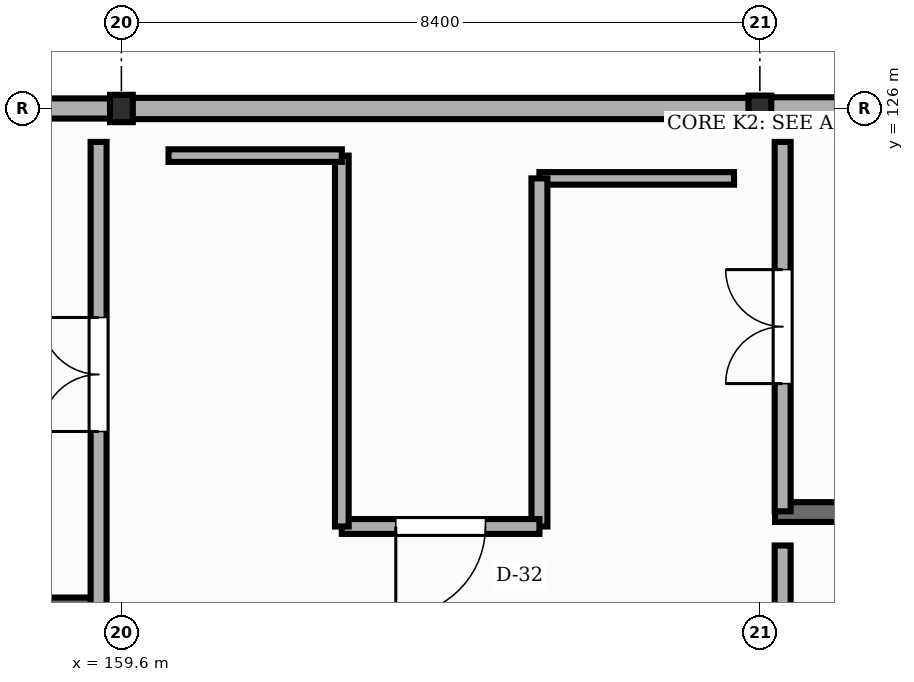
"""IFC4 building model, lengths in metres.
Left out: names, types, materials, properties, quantities, classifications, styles, units other than length and angle.
Written with IfcOpenShell. Run it as: python <this file> out.ifc"""

import sys

from ifc_helpers import new_model, si_unit, direction, frame, frame_2d, origin, origin_2d, place, context, subcontext, project, spatial, rectangle, i_section, extrude, element, fill, save


model = new_model("IFC4")
c1 = context("Model", 3, precision=1e-05, world=origin(), true_north=direction((0.0, 1.0)))
c2 = subcontext(c1, "Body", "Model", "MODEL_VIEW")
j1 = project(units=[si_unit("LENGTHUNIT", "METRE"), si_unit("PLANEANGLEUNIT", "RADIAN")], contexts=[c1])
p1 = place(None, origin())
s1 = spatial("IfcSite", under=j1, at=p1, CompositionType="ELEMENT")
p2 = place(p1, origin())
s2 = spatial("IfcBuilding", under=s1, at=p2, CompositionType="ELEMENT")
p3 = place(p2, frame((0.0, 0.0, 26.1)))
s3 = spatial("IfcBuildingStorey", under=s2, at=p3, CompositionType="ELEMENT", Elevation=26.1)
p4 = place(p3, frame((159.6, 126.0, 0.0), z_axis=(0.0, 0.0, 1.0), x_axis=(1.0, 0.0, 0.0)))
e1 = element("IfcColumn", 1, at=p4, inside=s3, PredefinedType="COLUMN", context=c2, shape_type="SweptSolid", body=[
    extrude(i_section(OverallWidth=0.3, OverallDepth=0.36, WebThickness=0.012, FlangeThickness=0.022, FilletRadius=0.027, at=origin_2d()), origin(), (0.0, 0.0, 1.0), 4.05),
])
p5 = place(p3, frame((168.0, 126.0, 0.0), z_axis=(0.0, 0.0, 1.0), x_axis=(1.0, 0.0, 0.0)))
e2 = element("IfcColumn", 2, at=p5, inside=s3, PredefinedType="COLUMN", context=c2, shape_type="SweptSolid", body=[
    extrude(i_section(OverallWidth=0.3, OverallDepth=0.34, WebThickness=0.012, FlangeThickness=0.021, FilletRadius=0.027, at=origin_2d()), origin(), (0.0, 0.0, 1.0), 4.05),
])
p6 = place(p3, frame((176.392, 126.0, 0.0), z_axis=(0.0, 0.0, 1.0), x_axis=(-1.0, 0.0, 0.0)))
e3 = element("IfcWall", 3, at=p6, inside=s3, PredefinedType="STANDARD", context=c2, shape_type="SweptSolid", body=[
    extrude(rectangle(XDim=8.384, YDim=0.295, at=frame_2d((4.192, 0.0))), origin(), (0.0, 0.0, 1.0), 3.527),
])
p7 = place(p3, frame((167.992, 126.0, 0.0), z_axis=(0.0, 0.0, 1.0), x_axis=(-1.0, 0.0, 0.0)))
e4 = element("IfcWall", 4, at=p7, inside=s3, PredefinedType="STANDARD", context=c2, shape_type="SweptSolid", body=[
    extrude(rectangle(XDim=8.384, YDim=0.28, at=frame_2d((4.192, 0.0))), origin(), (0.0, 0.0, 1.0), 3.497),
])
p8 = place(p3, frame((159.592, 126.0, 0.0), z_axis=(0.0, 0.0, 1.0), x_axis=(-1.0, 0.0, 0.0)))
e5 = element("IfcWall", 5, at=p8, inside=s3, PredefinedType="STANDARD", context=c2, shape_type="SweptSolid", body=[
    extrude(rectangle(XDim=8.384, YDim=0.265, at=frame_2d((4.192, 0.0))), origin(), (0.0, 0.0, 1.0), 3.527),
])
p9 = place(p3, frame((156.365, 119.435, 0.0), z_axis=(0.0, 0.0, 1.0), x_axis=(1.0, 0.0, 0.0)))
e6 = element("IfcWall", 6, at=p9, inside=s3, PredefinedType="SHEAR", context=c2, shape_type="SweptSolid", body=[
    extrude(rectangle(XDim=3.035, YDim=0.26, at=frame_2d((1.518, 0.0))), origin(), (0.0, 0.0, 1.0), 3.85),
])
p10 = place(p3, frame((159.3, 119.44, 0.0), z_axis=(0.0, 0.0, 1.0), x_axis=(0.0, 1.0, 0.0)))
e7 = element("IfcWall", 7, at=p10, inside=s3, PredefinedType="STANDARD", context=c2, shape_type="SweptSolid", body=[
    extrude(rectangle(XDim=6.12, YDim=0.21, at=frame_2d((3.06, 0.0))), origin(), (0.0, 0.0, 1.0), 3.367),
])
p11 = place(p10, frame((2.31, 0.0, 0.0)))
e8 = element("IfcOpeningElement", 8, at=p11, cuts=e7, PredefinedType="OPENING", context=c2, shape_type="SweptSolid", body=[
    extrude(rectangle(XDim=1.5, YDim=2.2, at=frame_2d((0.75, 1.1))), frame((0.0, 0.115, 0.0), z_axis=(0.0, -1.0, 0.0), x_axis=(1.0, 0.0, 0.0)), (0.0, 0.0, 1.0), 0.23),
])
p12 = place(p3, frame((168.2, 120.69, 0.0), z_axis=(0.0, 0.0, 1.0), x_axis=(1.0, 0.0, 0.0)))
e9 = element("IfcWall", 9, at=p12, inside=s3, PredefinedType="SHEAR", context=c2, shape_type="SweptSolid", body=[
    extrude(rectangle(XDim=3.035, YDim=0.26, at=frame_2d((1.518, 0.0))), origin(), (0.0, 0.0, 1.0), 3.85),
])
p13 = place(p3, frame((168.3, 115.92, 0.0), z_axis=(0.0, 0.0, 1.0), x_axis=(0.0, 1.0, 0.0)))
e10 = element("IfcWall", 10, at=p13, inside=s3, PredefinedType="STANDARD", context=c2, shape_type="SweptSolid", body=[
    extrude(rectangle(XDim=4.33, YDim=0.21, at=frame_2d((2.165, 0.0))), origin(), (0.0, 0.0, 1.0), 3.367),
])
p14 = place(p13, frame((0.45, 0.0, 0.0)))
e11 = element("IfcOpeningElement", 11, at=p14, cuts=e10, PredefinedType="OPENING", context=c2, shape_type="SweptSolid", body=[
    extrude(rectangle(XDim=0.95, YDim=2.15, at=frame_2d((0.475, 1.075))), frame((0.0, 0.115, 0.0), z_axis=(0.0, -1.0, 0.0), x_axis=(1.0, 0.0, 0.0)), (0.0, 0.0, 1.0), 0.23),
])
p15 = place(p3, frame((168.3, 120.7, 0.0), z_axis=(0.0, 0.0, 1.0), x_axis=(0.0, 1.0, 0.0)))
e12 = element("IfcWall", 12, at=p15, inside=s3, PredefinedType="STANDARD", context=c2, shape_type="SweptSolid", body=[
    extrude(rectangle(XDim=4.86, YDim=0.21, at=frame_2d((2.43, 0.0))), origin(), (0.0, 0.0, 1.0), 3.457),
])
p16 = place(p15, frame((1.68, 0.0, 0.0)))
e13 = element("IfcOpeningElement", 13, at=p16, cuts=e12, PredefinedType="OPENING", context=c2, shape_type="SweptSolid", body=[
    extrude(rectangle(XDim=1.5, YDim=2.2, at=frame_2d((0.75, 1.1))), frame((0.0, 0.115, 0.0), z_axis=(0.0, -1.0, 0.0), x_axis=(1.0, 0.0, 0.0)), (0.0, 0.0, 1.0), 0.23),
])
p17 = place(p3, frame((167.66, 125.08, -0.004), z_axis=(0.0, 0.0, 1.0), x_axis=(-1.0, 0.0, 0.0)))
e14 = element("IfcWall", 14, at=p17, inside=s3, PredefinedType="STANDARD", context=c2, shape_type="SweptSolid", body=[
    extrude(rectangle(XDim=2.56, YDim=0.165, at=frame_2d((1.28, 0.0))), origin(), (0.0, 0.0, 1.0), 3.854),
])
p18 = place(p3, frame((165.1, 125.08, -0.004), z_axis=(0.0, 0.0, 1.0), x_axis=(0.0, -1.0, 0.0)))
e15 = element("IfcWall", 15, at=p18, inside=s3, PredefinedType="STANDARD", context=c2, shape_type="SweptSolid", body=[
    extrude(rectangle(XDim=4.58, YDim=0.21, at=frame_2d((2.29, 0.0))), origin(), (0.0, 0.0, 1.0), 3.591),
])
p19 = place(p3, frame((165.1, 120.5, -0.004), z_axis=(0.0, 0.0, 1.0), x_axis=(-1.0, 0.0, 0.0)))
e16 = element("IfcWall", 16, at=p19, inside=s3, PredefinedType="STANDARD", context=c2, shape_type="SweptSolid", body=[
    extrude(rectangle(XDim=2.6, YDim=0.195, at=frame_2d((1.3, 0.0))), origin(), (0.0, 0.0, 1.0), 3.854),
])
p20 = place(p19, frame((0.71, 0.0, 0.0)))
e17 = element("IfcOpeningElement", 17, at=p20, cuts=e16, PredefinedType="OPENING", context=c2, shape_type="SweptSolid", body=[
    extrude(rectangle(XDim=1.18, YDim=2.3, at=frame_2d((0.59, 1.15))), frame((0.0, 0.107, 0.0), z_axis=(0.0, -1.0, 0.0), x_axis=(1.0, 0.0, 0.0)), (0.0, 0.0, 1.0), 0.215),
])
p21 = place(p3, frame((162.5, 120.5, -0.004), z_axis=(0.0, 0.0, 1.0), x_axis=(0.0, 1.0, 0.0)))
e18 = element("IfcWall", 18, at=p21, inside=s3, PredefinedType="STANDARD", context=c2, shape_type="SweptSolid", body=[
    extrude(rectangle(XDim=4.88, YDim=0.18, at=frame_2d((2.44, 0.0))), origin(), (0.0, 0.0, 1.0), 3.591),
])
p22 = place(p3, frame((162.5, 125.38, -0.004), z_axis=(0.0, 0.0, 1.0), x_axis=(-1.0, 0.0, 0.0)))
e19 = element("IfcWall", 19, at=p22, inside=s3, PredefinedType="STANDARD", context=c2, shape_type="SweptSolid", body=[
    extrude(rectangle(XDim=2.28, YDim=0.165, at=frame_2d((1.14, 0.0))), origin(), (0.0, 0.0, 1.0), 3.854),
])
p23 = place(p11, origin())
e20 = element("IfcDoor", 20, at=p23, inside=s3, OperationType="DOUBLE_DOOR_SINGLE_SWING", PredefinedType="DOOR", context=c2, shape_type="SweptSolid", body=[
    extrude(rectangle(XDim=1.5, YDim=2.2, at=frame_2d((0.75, 1.1))), frame((0.0, 0.025, 0.0), z_axis=(0.0, -1.0, 0.0), x_axis=(1.0, 0.0, 0.0)), (0.0, 0.0, 1.0), 0.05),
])
fill(e8, e20)
p24 = place(p16, origin())
e21 = element("IfcDoor", 21, at=p24, inside=s3, OperationType="DOUBLE_DOOR_SINGLE_SWING", PredefinedType="DOOR", context=c2, shape_type="SweptSolid", body=[
    extrude(rectangle(XDim=1.5, YDim=2.2, at=frame_2d((0.75, 1.1))), frame((0.0, 0.025, 0.0), z_axis=(0.0, -1.0, 0.0), x_axis=(1.0, 0.0, 0.0)), (0.0, 0.0, 1.0), 0.05),
])
fill(e13, e21)
p25 = place(p20, origin())
e22 = element("IfcDoor", 22, at=p25, inside=s3, OperationType="SINGLE_SWING_RIGHT", PredefinedType="DOOR", context=c2, shape_type="SweptSolid", body=[
    extrude(rectangle(XDim=1.18, YDim=2.3, at=frame_2d((0.59, 1.15))), frame((0.0, 0.025, 0.0), z_axis=(0.0, -1.0, 0.0), x_axis=(1.0, 0.0, 0.0)), (0.0, 0.0, 1.0), 0.05),
])
fill(e17, e22)
save(model, sys.argv[1])
